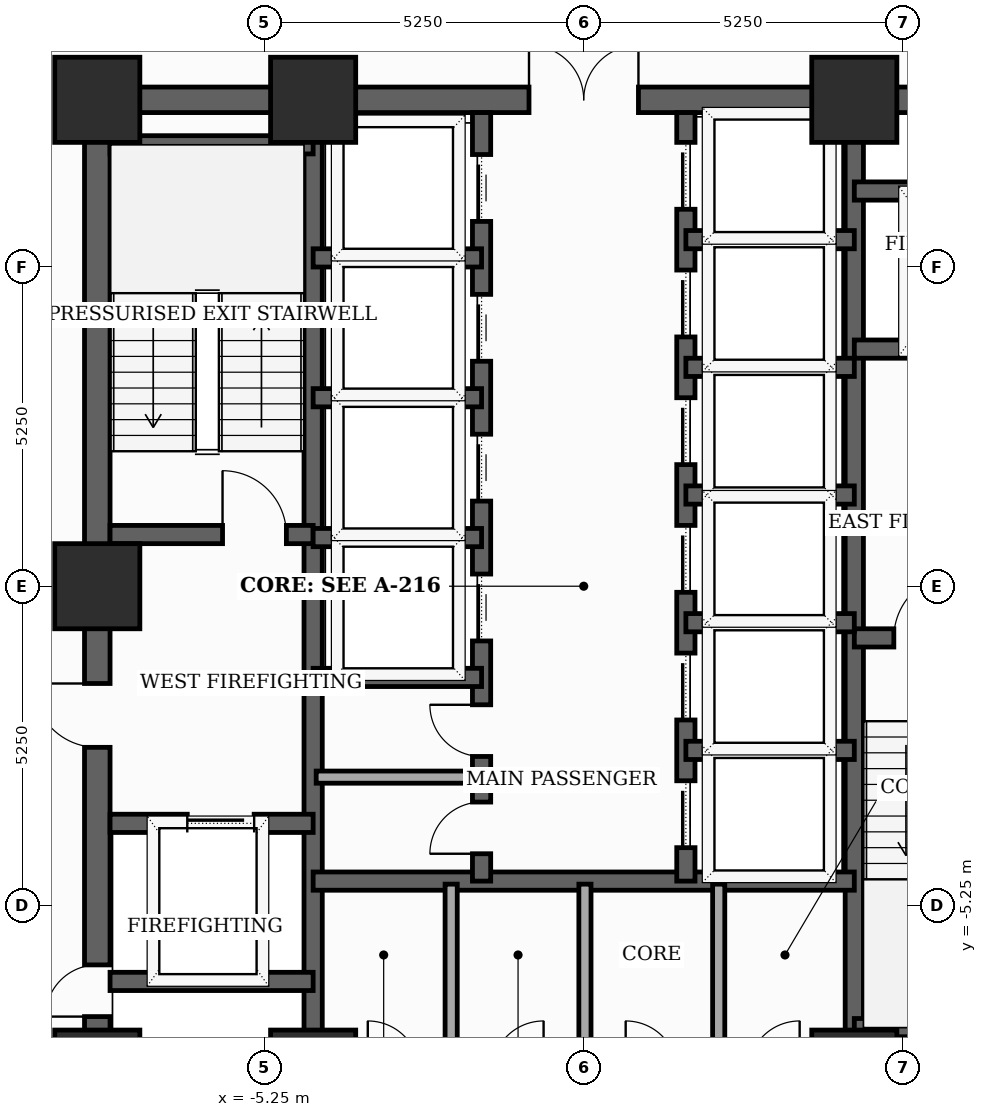
"""IFC4 building model, lengths in metres.
Left out: names, types, materials, properties, quantities, classifications, styles, units other than length and angle.
Written with IfcOpenShell. Run it as: python <this file> out.ifc"""

import sys

from ifc_helpers import new_model, si_unit, direction, frame, frame_2d, origin, origin_2d, place, context, subcontext, project, spatial, rectangle, extrude, element, fill, save


model = new_model("IFC4")
c1 = context("Model", 3, precision=1e-05, world=origin(), true_north=direction((0.0, 1.0)))
c2 = subcontext(c1, "Body", "Model", "MODEL_VIEW")
j1 = project(units=[si_unit("LENGTHUNIT", "METRE"), si_unit("PLANEANGLEUNIT", "RADIAN")], contexts=[c1])
p1 = place(None, origin())
s1 = spatial("IfcSite", under=j1, at=p1, CompositionType="ELEMENT")
p2 = place(p1, origin())
s2 = spatial("IfcBuilding", under=s1, at=p2, CompositionType="ELEMENT")
p3 = place(p2, frame((0.0, 0.0, 116.2)))
s3 = spatial("IfcBuildingStorey", under=s2, at=p3, CompositionType="ELEMENT", Elevation=116.2)
for number, where, z_axis, x_axis in (
    (1, (-8.0, -8.0, 0.0), (0.0, 0.0, 1.0), (1.0, 0.0, 0.0)),
    (2, (-4.45, -8.0, 0.0), (0.0, 0.0, 1.0), (1.0, 0.0, 0.0)),
    (3, (4.45, -8.0, 0.0), (0.0, 0.0, 1.0), (1.0, 0.0, 0.0)),
    (4, (4.45, 8.0, 0.0), (0.0, 0.0, 1.0), (1.0, 0.0, 0.0)),
    (5, (-4.45, 8.0, 0.0), (0.0, 0.0, 1.0), (1.0, 0.0, 0.0)),
    (6, (-8.0, 8.0, 0.0), (0.0, 0.0, 1.0), (1.0, 0.0, 0.0)),
    (7, (-8.0, 0.0, 0.0), (0.0, 0.0, 1.0), (1.0, 0.0, 0.0)),
):
    element("IfcColumn", number, at=place(p3, frame(where, z_axis=z_axis, x_axis=x_axis)), inside=s3, PredefinedType="COLUMN", context=c2, shape_type="SweptSolid", body=[
        extrude(rectangle(XDim=1.4, YDim=1.4, at=origin_2d()), origin(), (0.0, 0.0, 1.0), 3.7),
    ])
p4 = place(p3, frame((-8.0, -8.0, 0.0), z_axis=(0.0, 0.0, 1.0), x_axis=(0.0, 1.0, 0.0)))
e8 = element("IfcWall", 8, at=p4, inside=s3, PredefinedType="SHEAR", context=c2, shape_type="SweptSolid", body=[
    extrude(rectangle(XDim=16.0, YDim=0.42, at=frame_2d((8.0, 0.0))), origin(), (0.0, 0.0, 1.0), 3.5),
])
p5 = place(p4, frame((0.922, 0.0, 0.0)))
e9 = element("IfcOpeningElement", 9, at=p5, cuts=e8, PredefinedType="OPENING", context=c2, shape_type="SweptSolid", body=[
    extrude(rectangle(XDim=0.85, YDim=2.02, at=frame_2d((0.425, 1.01))), frame((0.0, 0.22, 0.0), z_axis=(0.0, -1.0, 0.0), x_axis=(1.0, 0.0, 0.0)), (0.0, 0.0, 1.0), 0.44),
])
p6 = place(p4, frame((5.35, 0.0, 0.0)))
e10 = element("IfcOpeningElement", 10, at=p6, cuts=e8, PredefinedType="OPENING", context=c2, shape_type="SweptSolid", body=[
    extrude(rectangle(XDim=1.05, YDim=2.15, at=frame_2d((0.525, 1.075))), frame((0.0, 0.22, 0.0), z_axis=(0.0, -1.0, 0.0), x_axis=(1.0, 0.0, 0.0)), (0.0, 0.0, 1.0), 0.44),
])
p7 = place(p3, frame((-8.0, 8.0, 0.0), z_axis=(0.0, 0.0, 1.0), x_axis=(1.0, 0.0, 0.0)))
e11 = element("IfcWall", 11, at=p7, inside=s3, PredefinedType="SHEAR", context=c2, shape_type="SweptSolid", body=[
    extrude(rectangle(XDim=16.0, YDim=0.42, at=frame_2d((8.0, 0.0))), origin(), (0.0, 0.0, 1.0), 3.5),
])
p8 = place(p7, frame((7.1, 0.0, 0.0)))
e12 = element("IfcOpeningElement", 12, at=p8, cuts=e11, PredefinedType="OPENING", context=c2, shape_type="SweptSolid", body=[
    extrude(rectangle(XDim=1.8, YDim=2.15, at=frame_2d((0.9, 1.075))), frame((0.0, 0.22, 0.0), z_axis=(0.0, -1.0, 0.0), x_axis=(1.0, 0.0, 0.0)), (0.0, 0.0, 1.0), 0.44),
])
for number, where, z_axis, x_axis in (
    (13, (-4.45, -7.79, 0.0), (0.0, 0.0, 1.0), (0.0, 1.0, 0.0)),
    (14, (4.45, -7.79, 0.0), (0.0, 0.0, 1.0), (0.0, 1.0, 0.0)),
):
    element("IfcWall", number, at=place(p3, frame(where, z_axis=z_axis, x_axis=x_axis)), inside=s3, PredefinedType="SHEAR", context=c2, shape_type="SweptSolid", body=[
        extrude(rectangle(XDim=15.58, YDim=0.3, at=frame_2d((7.79, 0.0))), origin(), (0.0, 0.0, 1.0), 3.5),
    ])
p9 = place(p3, frame((-7.79, 0.85, 0.0), z_axis=(0.0, 0.0, 1.0), x_axis=(1.0, 0.0, 0.0)))
e15 = element("IfcWall", 15, at=p9, inside=s3, PredefinedType="SHEAR", context=c2, shape_type="SweptSolid", body=[
    extrude(rectangle(XDim=3.34, YDim=0.3, at=frame_2d((1.67, 0.0))), origin(), (0.0, 0.0, 1.0), 3.5),
])
p10 = place(p9, frame((1.85, 0.0, 0.0)))
e16 = element("IfcOpeningElement", 16, at=p10, cuts=e15, PredefinedType="OPENING", context=c2, shape_type="SweptSolid", body=[
    extrude(rectangle(XDim=1.05, YDim=2.15, at=frame_2d((0.525, 1.075))), frame((0.0, 0.16, 0.0), z_axis=(0.0, -1.0, 0.0), x_axis=(1.0, 0.0, 0.0)), (0.0, 0.0, 1.0), 0.32),
])
p11 = place(p3, frame((-7.79, 7.26, 0.0), z_axis=(0.0, 0.0, 1.0), x_axis=(1.0, 0.0, 0.0)))
e17 = element("IfcWall", 17, at=p11, inside=s3, PredefinedType="SHEAR", context=c2, shape_type="SweptSolid", body=[
    extrude(rectangle(XDim=3.34, YDim=0.3, at=frame_2d((1.67, 0.0))), origin(), (0.0, 0.0, 1.0), 3.5),
])
p12 = place(p3, frame((4.45, -0.85, 0.0), z_axis=(0.0, 0.0, 1.0), x_axis=(1.0, 0.0, 0.0)))
e18 = element("IfcWall", 18, at=p12, inside=s3, PredefinedType="SHEAR", context=c2, shape_type="SweptSolid", body=[
    extrude(rectangle(XDim=3.34, YDim=0.3, at=frame_2d((1.67, 0.0))), origin(), (0.0, 0.0, 1.0), 3.5),
])
p13 = place(p12, frame((0.65, 0.0, 0.0)))
e19 = element("IfcOpeningElement", 19, at=p13, cuts=e18, PredefinedType="OPENING", context=c2, shape_type="SweptSolid", body=[
    extrude(rectangle(XDim=1.05, YDim=2.15, at=frame_2d((0.525, 1.075))), frame((0.0, 0.16, 0.0), z_axis=(0.0, -1.0, 0.0), x_axis=(1.0, 0.0, 0.0)), (0.0, 0.0, 1.0), 0.32),
])
p14 = place(p3, frame((4.45, -7.26, 0.0), z_axis=(0.0, 0.0, 1.0), x_axis=(1.0, 0.0, 0.0)))
e20 = element("IfcWall", 20, at=p14, inside=s3, PredefinedType="SHEAR", context=c2, shape_type="SweptSolid", body=[
    extrude(rectangle(XDim=3.55, YDim=0.3, at=frame_2d((1.775, 0.0))), origin(), (0.0, 0.0, 1.0), 3.5),
])
p15 = place(p3, frame((-7.79, -3.9, 0.0), z_axis=(0.0, 0.0, 1.0), x_axis=(1.0, 0.0, 0.0)))
e21 = element("IfcWall", 21, at=p15, inside=s3, PredefinedType="SHEAR", context=c2, shape_type="SweptSolid", body=[
    extrude(rectangle(XDim=3.34, YDim=0.3, at=frame_2d((1.67, 0.0))), origin(), (0.0, 0.0, 1.0), 3.5),
])
p16 = place(p15, frame((1.27, 0.0, 0.0)))
e22 = element("IfcOpeningElement", 22, at=p16, cuts=e21, PredefinedType="OPENING", context=c2, shape_type="SweptSolid", body=[
    extrude(rectangle(XDim=1.1, YDim=2.1, at=frame_2d((0.55, 1.05))), frame((0.0, 0.16, 0.0), z_axis=(0.0, -1.0, 0.0), x_axis=(1.0, 0.0, 0.0)), (0.0, 0.0, 1.0), 0.32),
])
p17 = place(p3, frame((-7.79, -6.5, 0.0), z_axis=(0.0, 0.0, 1.0), x_axis=(1.0, 0.0, 0.0)))
e23 = element("IfcWall", 23, at=p17, inside=s3, PredefinedType="SHEAR", context=c2, shape_type="SweptSolid", body=[
    extrude(rectangle(XDim=3.34, YDim=0.3, at=frame_2d((1.67, 0.0))), origin(), (0.0, 0.0, 1.0), 3.5),
])
p18 = place(p3, frame((4.45, 3.9, 0.0), z_axis=(0.0, 0.0, 1.0), x_axis=(1.0, 0.0, 0.0)))
e24 = element("IfcWall", 24, at=p18, inside=s3, PredefinedType="SHEAR", context=c2, shape_type="SweptSolid", body=[
    extrude(rectangle(XDim=3.34, YDim=0.3, at=frame_2d((1.67, 0.0))), origin(), (0.0, 0.0, 1.0), 3.5),
])
p19 = place(p18, frame((1.18, 0.0, 0.0)))
e25 = element("IfcOpeningElement", 25, at=p19, cuts=e24, PredefinedType="OPENING", context=c2, shape_type="SweptSolid", body=[
    extrude(rectangle(XDim=1.1, YDim=2.1, at=frame_2d((0.55, 1.05))), frame((0.0, 0.16, 0.0), z_axis=(0.0, -1.0, 0.0), x_axis=(1.0, 0.0, 0.0)), (0.0, 0.0, 1.0), 0.32),
])
p20 = place(p3, frame((4.45, 6.5, 0.0), z_axis=(0.0, 0.0, 1.0), x_axis=(1.0, 0.0, 0.0)))
e26 = element("IfcWall", 26, at=p20, inside=s3, PredefinedType="SHEAR", context=c2, shape_type="SweptSolid", body=[
    extrude(rectangle(XDim=3.34, YDim=0.3, at=frame_2d((1.67, 0.0))), origin(), (0.0, 0.0, 1.0), 3.5),
])
p21 = place(p3, frame((-4.45, -4.85, 0.0), z_axis=(0.0, 0.0, 1.0), x_axis=(1.0, 0.0, 0.0)))
e27 = element("IfcWall", 27, at=p21, inside=s3, PredefinedType="SHEAR", context=c2, shape_type="SweptSolid", body=[
    extrude(rectangle(XDim=8.9, YDim=0.3, at=frame_2d((4.45, 0.0))), origin(), (0.0, 0.0, 1.0), 3.5),
])
p22 = place(p3, frame((-1.68, -4.85, 0.0), z_axis=(0.0, 0.0, 1.0), x_axis=(0.0, 1.0, 0.0)))
e28 = element("IfcWall", 28, at=p22, inside=s3, PredefinedType="SHEAR", context=c2, shape_type="SweptSolid", body=[
    extrude(rectangle(XDim=12.64, YDim=0.3, at=frame_2d((6.32, 0.0))), origin(), (0.0, 0.0, 1.0), 3.5),
])
p23 = place(p22, frame((3.95, 0.0, 0.0)))
e29 = element("IfcOpeningElement", 29, at=p23, cuts=e28, PredefinedType="OPENING", context=c2, shape_type="SweptSolid", body=[
    extrude(rectangle(XDim=1.1, YDim=2.1, at=frame_2d((0.55, 1.05))), frame((0.0, 0.16, 0.0), z_axis=(0.0, -1.0, 0.0), x_axis=(1.0, 0.0, 0.0)), (0.0, 0.0, 1.0), 0.32),
])
p24 = place(p22, frame((6.25, 0.0, 0.0)))
e30 = element("IfcOpeningElement", 30, at=p24, cuts=e28, PredefinedType="OPENING", context=c2, shape_type="SweptSolid", body=[
    extrude(rectangle(XDim=1.1, YDim=2.1, at=frame_2d((0.55, 1.05))), frame((0.0, 0.16, 0.0), z_axis=(0.0, -1.0, 0.0), x_axis=(1.0, 0.0, 0.0)), (0.0, 0.0, 1.0), 0.32),
])
p25 = place(p22, frame((8.55, 0.0, 0.0)))
e31 = element("IfcOpeningElement", 31, at=p25, cuts=e28, PredefinedType="OPENING", context=c2, shape_type="SweptSolid", body=[
    extrude(rectangle(XDim=1.1, YDim=2.1, at=frame_2d((0.55, 1.05))), frame((0.0, 0.16, 0.0), z_axis=(0.0, -1.0, 0.0), x_axis=(1.0, 0.0, 0.0)), (0.0, 0.0, 1.0), 0.32),
])
p26 = place(p22, frame((10.85, 0.0, 0.0)))
e32 = element("IfcOpeningElement", 32, at=p26, cuts=e28, PredefinedType="OPENING", context=c2, shape_type="SweptSolid", body=[
    extrude(rectangle(XDim=1.1, YDim=2.1, at=frame_2d((0.55, 1.05))), frame((0.0, 0.16, 0.0), z_axis=(0.0, -1.0, 0.0), x_axis=(1.0, 0.0, 0.0)), (0.0, 0.0, 1.0), 0.32),
])
p27 = place(p22, frame((0.45, 0.0, 0.0)))
e33 = element("IfcOpeningElement", 33, at=p27, cuts=e28, PredefinedType="OPENING", context=c2, shape_type="SweptSolid", body=[
    extrude(rectangle(XDim=0.85, YDim=2.02, at=frame_2d((0.425, 1.01))), frame((0.0, 0.16, 0.0), z_axis=(0.0, -1.0, 0.0), x_axis=(1.0, 0.0, 0.0)), (0.0, 0.0, 1.0), 0.32),
])
p28 = place(p22, frame((2.05, 0.0, 0.0)))
e34 = element("IfcOpeningElement", 34, at=p28, cuts=e28, PredefinedType="OPENING", context=c2, shape_type="SweptSolid", body=[
    extrude(rectangle(XDim=0.85, YDim=2.02, at=frame_2d((0.425, 1.01))), frame((0.0, 0.16, 0.0), z_axis=(0.0, -1.0, 0.0), x_axis=(1.0, 0.0, 0.0)), (0.0, 0.0, 1.0), 0.32),
])
p29 = place(p3, frame((1.68, -4.85, 0.0), z_axis=(0.0, 0.0, 1.0), x_axis=(0.0, 1.0, 0.0)))
e35 = element("IfcWall", 35, at=p29, inside=s3, PredefinedType="SHEAR", context=c2, shape_type="SweptSolid", body=[
    extrude(rectangle(XDim=12.64, YDim=0.3, at=frame_2d((6.32, 0.0))), origin(), (0.0, 0.0, 1.0), 3.5),
])
p30 = place(p29, frame((0.55, 0.0, 0.0)))
e36 = element("IfcOpeningElement", 36, at=p30, cuts=e35, PredefinedType="OPENING", context=c2, shape_type="SweptSolid", body=[
    extrude(rectangle(XDim=1.1, YDim=2.1, at=frame_2d((0.55, 1.05))), frame((0.0, 0.16, 0.0), z_axis=(0.0, -1.0, 0.0), x_axis=(1.0, 0.0, 0.0)), (0.0, 0.0, 1.0), 0.32),
])
p31 = place(p29, frame((2.65, 0.0, 0.0)))
e37 = element("IfcOpeningElement", 37, at=p31, cuts=e35, PredefinedType="OPENING", context=c2, shape_type="SweptSolid", body=[
    extrude(rectangle(XDim=1.1, YDim=2.1, at=frame_2d((0.55, 1.05))), frame((0.0, 0.16, 0.0), z_axis=(0.0, -1.0, 0.0), x_axis=(1.0, 0.0, 0.0)), (0.0, 0.0, 1.0), 0.32),
])
p32 = place(p29, frame((4.75, 0.0, 0.0)))
e38 = element("IfcOpeningElement", 38, at=p32, cuts=e35, PredefinedType="OPENING", context=c2, shape_type="SweptSolid", body=[
    extrude(rectangle(XDim=1.1, YDim=2.1, at=frame_2d((0.55, 1.05))), frame((0.0, 0.16, 0.0), z_axis=(0.0, -1.0, 0.0), x_axis=(1.0, 0.0, 0.0)), (0.0, 0.0, 1.0), 0.32),
])
p33 = place(p29, frame((6.85, 0.0, 0.0)))
e39 = element("IfcOpeningElement", 39, at=p33, cuts=e35, PredefinedType="OPENING", context=c2, shape_type="SweptSolid", body=[
    extrude(rectangle(XDim=1.1, YDim=2.1, at=frame_2d((0.55, 1.05))), frame((0.0, 0.16, 0.0), z_axis=(0.0, -1.0, 0.0), x_axis=(1.0, 0.0, 0.0)), (0.0, 0.0, 1.0), 0.32),
])
p34 = place(p29, frame((8.95, 0.0, 0.0)))
e40 = element("IfcOpeningElement", 40, at=p34, cuts=e35, PredefinedType="OPENING", context=c2, shape_type="SweptSolid", body=[
    extrude(rectangle(XDim=1.1, YDim=2.1, at=frame_2d((0.55, 1.05))), frame((0.0, 0.16, 0.0), z_axis=(0.0, -1.0, 0.0), x_axis=(1.0, 0.0, 0.0)), (0.0, 0.0, 1.0), 0.32),
])
p35 = place(p29, frame((11.05, 0.0, 0.0)))
e41 = element("IfcOpeningElement", 41, at=p35, cuts=e35, PredefinedType="OPENING", context=c2, shape_type="SweptSolid", body=[
    extrude(rectangle(XDim=1.1, YDim=2.1, at=frame_2d((0.55, 1.05))), frame((0.0, 0.16, 0.0), z_axis=(0.0, -1.0, 0.0), x_axis=(1.0, 0.0, 0.0)), (0.0, 0.0, 1.0), 0.32),
])
for number, where, z_axis, x_axis in (
    (42, (-4.45, -1.5, 0.0), (0.0, 0.0, 1.0), (1.0, 0.0, 0.0)),
    (43, (-4.45, 0.8, 0.0), (0.0, 0.0, 1.0), (1.0, 0.0, 0.0)),
    (44, (-4.45, 3.1, 0.0), (0.0, 0.0, 1.0), (1.0, 0.0, 0.0)),
    (45, (-4.45, 5.4, 0.0), (0.0, 0.0, 1.0), (1.0, 0.0, 0.0)),
    (46, (1.68, 1.5, 0.0), (0.0, 0.0, 1.0), (1.0, 0.0, 0.0)),
    (47, (1.68, 3.6, 0.0), (0.0, 0.0, 1.0), (1.0, 0.0, 0.0)),
    (48, (1.68, 5.7, 0.0), (0.0, 0.0, 1.0), (1.0, 0.0, 0.0)),
    (49, (1.68, -2.7, 0.0), (0.0, 0.0, 1.0), (1.0, 0.0, 0.0)),
    (50, (1.68, -0.6, 0.0), (0.0, 0.0, 1.0), (1.0, 0.0, 0.0)),
):
    element("IfcWall", number, at=place(p3, frame(where, z_axis=z_axis, x_axis=x_axis)), inside=s3, PredefinedType="SHEAR", context=c2, shape_type="SweptSolid", body=[
        extrude(rectangle(XDim=2.77, YDim=0.3, at=frame_2d((1.385, 0.0))), origin(), (0.0, 0.0, 1.0), 3.5),
    ])
for number, where, z_axis, x_axis in (
    (51, (-2.18, -7.85, 0.0), (0.0, 0.0, 1.0), (0.0, 1.0, 0.0)),
    (52, (0.02, -7.85, 0.0), (0.0, 0.0, 1.0), (0.0, 1.0, 0.0)),
    (53, (2.22, -7.85, 0.0), (0.0, 0.0, 1.0), (0.0, 1.0, 0.0)),
):
    element("IfcWall", number, at=place(p3, frame(where, z_axis=z_axis, x_axis=x_axis)), inside=s3, PredefinedType="SOLIDWALL", context=c2, shape_type="SweptSolid", body=[
        extrude(rectangle(XDim=2.95, YDim=0.2, at=frame_2d((1.475, 0.0))), origin(), (0.0, 0.0, 1.0), 2.885),
    ])
p36 = place(p3, frame((-4.4, -3.14, 0.0), z_axis=(0.0, 0.0, 1.0), x_axis=(1.0, 0.0, 0.0)))
e54 = element("IfcWall", 54, at=p36, inside=s3, PredefinedType="SOLIDWALL", context=c2, shape_type="SweptSolid", body=[
    extrude(rectangle(XDim=2.68, YDim=0.2, at=frame_2d((1.34, 0.0))), origin(), (0.0, 0.0, 1.0), 3.5),
])
p37 = place(p5, origin())
e55 = element("IfcDoor", 55, at=p37, inside=s3, OperationType="SINGLE_SWING_LEFT", PredefinedType="TRAPDOOR", context=c2, shape_type="SweptSolid", body=[
    extrude(rectangle(XDim=0.85, YDim=2.02, at=frame_2d((0.425, 1.01))), frame((0.0, 0.025, 0.0), z_axis=(0.0, -1.0, 0.0), x_axis=(1.0, 0.0, 0.0)), (0.0, 0.0, 1.0), 0.05),
])
fill(e9, e55)
p38 = place(p6, origin())
e56 = element("IfcDoor", 56, at=p38, inside=s3, OperationType="SINGLE_SWING_RIGHT", PredefinedType="DOOR", context=c2, shape_type="SweptSolid", body=[
    extrude(rectangle(XDim=1.05, YDim=2.15, at=frame_2d((0.525, 1.075))), frame((0.0, 0.025, 0.0), z_axis=(0.0, -1.0, 0.0), x_axis=(1.0, 0.0, 0.0)), (0.0, 0.0, 1.0), 0.05),
])
fill(e10, e56)
p39 = place(p8, origin())
e57 = element("IfcDoor", 57, at=p39, inside=s3, OperationType="DOUBLE_DOOR_SINGLE_SWING", PredefinedType="DOOR", context=c2, shape_type="SweptSolid", body=[
    extrude(rectangle(XDim=1.8, YDim=2.15, at=frame_2d((0.9, 1.075))), frame((0.0, 0.025, 0.0), z_axis=(0.0, -1.0, 0.0), x_axis=(1.0, 0.0, 0.0)), (0.0, 0.0, 1.0), 0.05),
])
fill(e12, e57)
p40 = place(p10, origin())
e58 = element("IfcDoor", 58, at=p40, inside=s3, OperationType="SINGLE_SWING_LEFT", PredefinedType="DOOR", context=c2, shape_type="SweptSolid", body=[
    extrude(rectangle(XDim=1.05, YDim=2.15, at=frame_2d((0.525, 1.075))), frame((0.0, 0.025, 0.0), z_axis=(0.0, -1.0, 0.0), x_axis=(1.0, 0.0, 0.0)), (0.0, 0.0, 1.0), 0.05),
])
fill(e16, e58)
p41 = place(p13, origin())
e59 = element("IfcDoor", 59, at=p41, inside=s3, OperationType="SINGLE_SWING_RIGHT", PredefinedType="DOOR", context=c2, shape_type="SweptSolid", body=[
    extrude(rectangle(XDim=1.05, YDim=2.15, at=frame_2d((0.525, 1.075))), frame((0.0, 0.025, 0.0), z_axis=(0.0, -1.0, 0.0), x_axis=(1.0, 0.0, 0.0)), (0.0, 0.0, 1.0), 0.05),
])
fill(e19, e59)
p42 = place(p16, origin())
e60 = element("IfcDoor", 60, at=p42, inside=s3, OperationType="SLIDING_TO_LEFT", PredefinedType="DOOR", context=c2, shape_type="SweptSolid", body=[
    extrude(rectangle(XDim=1.1, YDim=2.1, at=frame_2d((0.55, 1.05))), frame((0.0, 0.025, 0.0), z_axis=(0.0, -1.0, 0.0), x_axis=(1.0, 0.0, 0.0)), (0.0, 0.0, 1.0), 0.05),
])
fill(e22, e60)
p43 = place(p23, origin())
e61 = element("IfcDoor", 61, at=p43, inside=s3, OperationType="SLIDING_TO_LEFT", PredefinedType="DOOR", context=c2, shape_type="SweptSolid", body=[
    extrude(rectangle(XDim=1.1, YDim=2.1, at=frame_2d((0.55, 1.05))), frame((0.0, 0.025, 0.0), z_axis=(0.0, -1.0, 0.0), x_axis=(1.0, 0.0, 0.0)), (0.0, 0.0, 1.0), 0.05),
])
fill(e29, e61)
p44 = place(p24, origin())
e62 = element("IfcDoor", 62, at=p44, inside=s3, OperationType="SLIDING_TO_LEFT", PredefinedType="DOOR", context=c2, shape_type="SweptSolid", body=[
    extrude(rectangle(XDim=1.1, YDim=2.1, at=frame_2d((0.55, 1.05))), frame((0.0, 0.025, 0.0), z_axis=(0.0, -1.0, 0.0), x_axis=(1.0, 0.0, 0.0)), (0.0, 0.0, 1.0), 0.05),
])
fill(e30, e62)
p45 = place(p25, origin())
e63 = element("IfcDoor", 63, at=p45, inside=s3, OperationType="SLIDING_TO_LEFT", PredefinedType="DOOR", context=c2, shape_type="SweptSolid", body=[
    extrude(rectangle(XDim=1.1, YDim=2.1, at=frame_2d((0.55, 1.05))), frame((0.0, 0.025, 0.0), z_axis=(0.0, -1.0, 0.0), x_axis=(1.0, 0.0, 0.0)), (0.0, 0.0, 1.0), 0.05),
])
fill(e31, e63)
p46 = place(p26, origin())
e64 = element("IfcDoor", 64, at=p46, inside=s3, OperationType="SLIDING_TO_LEFT", PredefinedType="DOOR", context=c2, shape_type="SweptSolid", body=[
    extrude(rectangle(XDim=1.1, YDim=2.1, at=frame_2d((0.55, 1.05))), frame((0.0, 0.025, 0.0), z_axis=(0.0, -1.0, 0.0), x_axis=(1.0, 0.0, 0.0)), (0.0, 0.0, 1.0), 0.05),
])
fill(e32, e64)
p47 = place(p27, origin())
e65 = element("IfcDoor", 65, at=p47, inside=s3, OperationType="SINGLE_SWING_LEFT", PredefinedType="TRAPDOOR", context=c2, shape_type="SweptSolid", body=[
    extrude(rectangle(XDim=0.85, YDim=2.02, at=frame_2d((0.425, 1.01))), frame((0.0, 0.025, 0.0), z_axis=(0.0, -1.0, 0.0), x_axis=(1.0, 0.0, 0.0)), (0.0, 0.0, 1.0), 0.05),
])
fill(e33, e65)
p48 = place(p28, origin())
e66 = element("IfcDoor", 66, at=p48, inside=s3, OperationType="SINGLE_SWING_RIGHT", PredefinedType="TRAPDOOR", context=c2, shape_type="SweptSolid", body=[
    extrude(rectangle(XDim=0.85, YDim=2.02, at=frame_2d((0.425, 1.01))), frame((0.0, 0.025, 0.0), z_axis=(0.0, -1.0, 0.0), x_axis=(1.0, 0.0, 0.0)), (0.0, 0.0, 1.0), 0.05),
])
fill(e34, e66)
p49 = place(p30, origin())
e67 = element("IfcDoor", 67, at=p49, inside=s3, OperationType="SLIDING_TO_LEFT", PredefinedType="DOOR", context=c2, shape_type="SweptSolid", body=[
    extrude(rectangle(XDim=1.1, YDim=2.1, at=frame_2d((0.55, 1.05))), frame((0.0, 0.025, 0.0), z_axis=(0.0, -1.0, 0.0), x_axis=(1.0, 0.0, 0.0)), (0.0, 0.0, 1.0), 0.05),
])
fill(e36, e67)
p50 = place(p31, origin())
e68 = element("IfcDoor", 68, at=p50, inside=s3, OperationType="SLIDING_TO_LEFT", PredefinedType="DOOR", context=c2, shape_type="SweptSolid", body=[
    extrude(rectangle(XDim=1.1, YDim=2.1, at=frame_2d((0.55, 1.05))), frame((0.0, 0.025, 0.0), z_axis=(0.0, -1.0, 0.0), x_axis=(1.0, 0.0, 0.0)), (0.0, 0.0, 1.0), 0.05),
])
fill(e37, e68)
p51 = place(p32, origin())
e69 = element("IfcDoor", 69, at=p51, inside=s3, OperationType="SLIDING_TO_LEFT", PredefinedType="DOOR", context=c2, shape_type="SweptSolid", body=[
    extrude(rectangle(XDim=1.1, YDim=2.1, at=frame_2d((0.55, 1.05))), frame((0.0, 0.025, 0.0), z_axis=(0.0, -1.0, 0.0), x_axis=(1.0, 0.0, 0.0)), (0.0, 0.0, 1.0), 0.05),
])
fill(e38, e69)
p52 = place(p33, origin())
e70 = element("IfcDoor", 70, at=p52, inside=s3, OperationType="SLIDING_TO_LEFT", PredefinedType="DOOR", context=c2, shape_type="SweptSolid", body=[
    extrude(rectangle(XDim=1.1, YDim=2.1, at=frame_2d((0.55, 1.05))), frame((0.0, 0.025, 0.0), z_axis=(0.0, -1.0, 0.0), x_axis=(1.0, 0.0, 0.0)), (0.0, 0.0, 1.0), 0.05),
])
fill(e39, e70)
p53 = place(p34, origin())
e71 = element("IfcDoor", 71, at=p53, inside=s3, OperationType="SLIDING_TO_LEFT", PredefinedType="DOOR", context=c2, shape_type="SweptSolid", body=[
    extrude(rectangle(XDim=1.1, YDim=2.1, at=frame_2d((0.55, 1.05))), frame((0.0, 0.025, 0.0), z_axis=(0.0, -1.0, 0.0), x_axis=(1.0, 0.0, 0.0)), (0.0, 0.0, 1.0), 0.05),
])
fill(e40, e71)
p54 = place(p35, origin())
e72 = element("IfcDoor", 72, at=p54, inside=s3, OperationType="SLIDING_TO_LEFT", PredefinedType="DOOR", context=c2, shape_type="SweptSolid", body=[
    extrude(rectangle(XDim=1.1, YDim=2.1, at=frame_2d((0.55, 1.05))), frame((0.0, 0.025, 0.0), z_axis=(0.0, -1.0, 0.0), x_axis=(1.0, 0.0, 0.0)), (0.0, 0.0, 1.0), 0.05),
])
fill(e41, e72)
save(model, sys.argv[1])
